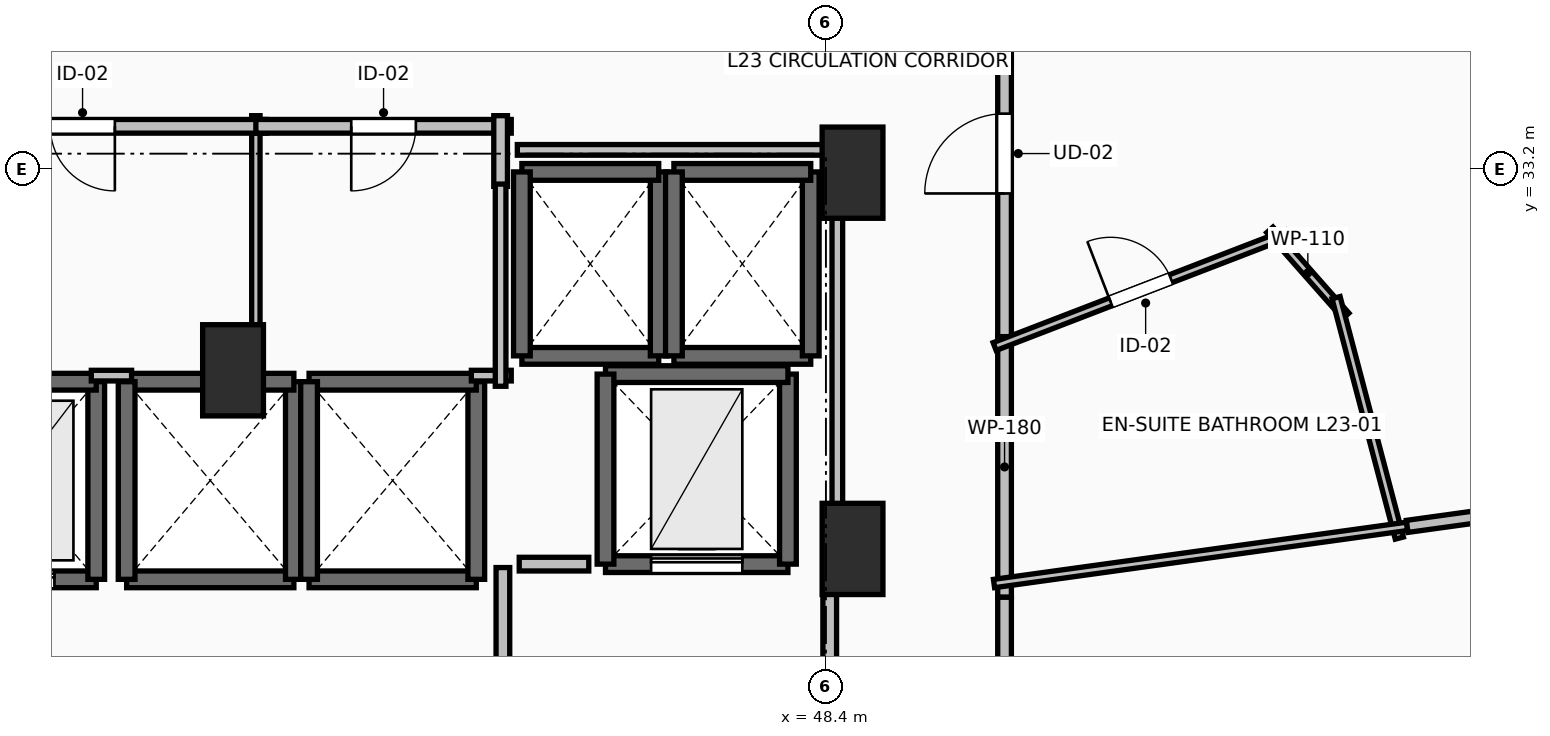
"""IFC4 building model, lengths in metres.
Left out: names, types, materials, properties, quantities, classifications, styles, units other than length and angle.
Written with IfcOpenShell. Run it as: python <this file> out.ifc"""

import sys

from ifc_helpers import new_model, si_unit, direction, frame, frame_2d, origin, origin_2d, place, context, subcontext, project, spatial, rectangle, extrude, element, fill, save


model = new_model("IFC4")
c1 = context("Model", 3, precision=1e-05, world=origin(), true_north=direction((0.0, 1.0)))
c2 = subcontext(c1, "Body", "Model", "MODEL_VIEW")
j1 = project(units=[si_unit("LENGTHUNIT", "METRE"), si_unit("PLANEANGLEUNIT", "RADIAN")], contexts=[c1])
p1 = place(None, origin())
s1 = spatial("IfcSite", under=j1, at=p1, CompositionType="ELEMENT")
p2 = place(p1, origin())
s2 = spatial("IfcBuilding", under=s1, at=p2, CompositionType="ELEMENT")
p3 = place(p2, frame((0.0, 0.0, 89.3)))
s3 = spatial("IfcBuildingStorey", under=s2, at=p3, CompositionType="ELEMENT", Elevation=89.3)
for number, where, z_axis, x_axis in (
    (1, (48.75, 33.15, 0.0), (0.0, 0.0, 1.0), (1.0, 0.0, 0.0)),
    (2, (48.75, 28.2, 0.0), (0.0, 0.0, 1.0), (1.0, 0.0, 0.0)),
    (3, (40.6, 30.55, 0.0), (0.0, 0.0, 1.0), (1.0, 0.0, 0.0)),
):
    element("IfcColumn", number, at=place(p3, frame(where, z_axis=z_axis, x_axis=x_axis)), inside=s3, PredefinedType="PILASTER", context=c2, shape_type="SweptSolid", body=[
        extrude(rectangle(XDim=0.8, YDim=1.2, at=origin_2d()), origin(), (0.0, 0.0, 1.0), 3.5),
    ])
p4 = place(p3, frame((36.6, 27.8, 0.0), z_axis=(0.0, 0.0, 1.0), x_axis=(1.0, 0.0, 0.0)))
e4 = element("IfcWall", 4, at=p4, inside=s3, PredefinedType="SOLIDWALL", context=c2, shape_type="SweptSolid", body=[
    extrude(rectangle(XDim=2.2, YDim=0.22, at=frame_2d((1.1, 0.0))), origin(), (0.0, 0.0, 1.0), 3.24),
])
p5 = place(p4, frame((0.55, 0.0, 0.0)))
e5 = element("IfcOpeningElement", 5, at=p5, cuts=e4, PredefinedType="OPENING", context=c2, shape_type="SweptSolid", body=[
    extrude(rectangle(XDim=1.1, YDim=2.2, at=frame_2d((0.55, 1.1))), frame((0.0, 0.125, 0.0), z_axis=(0.0, -1.0, 0.0), x_axis=(1.0, 0.0, 0.0)), (0.0, 0.0, 1.0), 0.25),
])
p6 = place(p3, frame((38.8, 27.8, 0.0), z_axis=(0.0, 0.0, 1.0), x_axis=(0.0, 1.0, 0.0)))
e6 = element("IfcWall", 6, at=p6, inside=s3, PredefinedType="SOLIDWALL", context=c2, shape_type="SweptSolid", body=[
    extrude(rectangle(XDim=2.6, YDim=0.22, at=frame_2d((1.3, 0.0))), origin(), (0.0, 0.0, 1.0), 3.24),
])
for number, where, z_axis, x_axis in (
    (7, (38.8, 30.4, 0.0), (0.0, 0.0, 1.0), (-1.0, 0.0, 0.0)),
    (8, (39.2, 27.8, 0.0), (0.0, 0.0, 1.0), (1.0, 0.0, 0.0)),
):
    element("IfcWall", number, at=place(p3, frame(where, z_axis=z_axis, x_axis=x_axis)), inside=s3, PredefinedType="SOLIDWALL", context=c2, shape_type="SweptSolid", body=[
        extrude(rectangle(XDim=2.2, YDim=0.22, at=frame_2d((1.1, 0.0))), origin(), (0.0, 0.0, 1.0), 3.24),
    ])
p7 = place(p3, frame((41.4, 27.8, 0.0), z_axis=(0.0, 0.0, 1.0), x_axis=(0.0, 1.0, 0.0)))
e9 = element("IfcWall", 9, at=p7, inside=s3, PredefinedType="SOLIDWALL", context=c2, shape_type="SweptSolid", body=[
    extrude(rectangle(XDim=2.6, YDim=0.22, at=frame_2d((1.3, 0.0))), origin(), (0.0, 0.0, 1.0), 3.24),
])
p8 = place(p3, frame((41.4, 30.4, 0.0), z_axis=(0.0, 0.0, 1.0), x_axis=(-1.0, 0.0, 0.0)))
e10 = element("IfcWall", 10, at=p8, inside=s3, PredefinedType="SOLIDWALL", context=c2, shape_type="SweptSolid", body=[
    extrude(rectangle(XDim=2.2, YDim=0.22, at=frame_2d((1.1, 0.0))), origin(), (0.0, 0.0, 1.0), 3.24),
])
p9 = place(p3, frame((39.2, 30.4, 0.0), z_axis=(0.0, 0.0, 1.0), x_axis=(0.0, -1.0, 0.0)))
e11 = element("IfcWall", 11, at=p9, inside=s3, PredefinedType="SOLIDWALL", context=c2, shape_type="SweptSolid", body=[
    extrude(rectangle(XDim=2.6, YDim=0.22, at=frame_2d((1.3, 0.0))), origin(), (0.0, 0.0, 1.0), 3.24),
])
p10 = place(p3, frame((41.6, 27.8, 0.0), z_axis=(0.0, 0.0, 1.0), x_axis=(1.0, 0.0, 0.0)))
e12 = element("IfcWall", 12, at=p10, inside=s3, PredefinedType="SOLIDWALL", context=c2, shape_type="SweptSolid", body=[
    extrude(rectangle(XDim=2.2, YDim=0.22, at=frame_2d((1.1, 0.0))), origin(), (0.0, 0.0, 1.0), 3.24),
])
p11 = place(p3, frame((43.8, 27.8, 0.0), z_axis=(0.0, 0.0, 1.0), x_axis=(0.0, 1.0, 0.0)))
e13 = element("IfcWall", 13, at=p11, inside=s3, PredefinedType="SOLIDWALL", context=c2, shape_type="SweptSolid", body=[
    extrude(rectangle(XDim=2.6, YDim=0.22, at=frame_2d((1.3, 0.0))), origin(), (0.0, 0.0, 1.0), 3.24),
])
p12 = place(p3, frame((43.8, 30.4, 0.0), z_axis=(0.0, 0.0, 1.0), x_axis=(-1.0, 0.0, 0.0)))
e14 = element("IfcWall", 14, at=p12, inside=s3, PredefinedType="SOLIDWALL", context=c2, shape_type="SweptSolid", body=[
    extrude(rectangle(XDim=2.2, YDim=0.22, at=frame_2d((1.1, 0.0))), origin(), (0.0, 0.0, 1.0), 3.24),
])
p13 = place(p3, frame((41.6, 30.4, 0.0), z_axis=(0.0, 0.0, 1.0), x_axis=(0.0, -1.0, 0.0)))
e15 = element("IfcWall", 15, at=p13, inside=s3, PredefinedType="SOLIDWALL", context=c2, shape_type="SweptSolid", body=[
    extrude(rectangle(XDim=2.6, YDim=0.22, at=frame_2d((1.3, 0.0))), origin(), (0.0, 0.0, 1.0), 3.24),
])
p14 = place(p3, frame((44.4, 30.74, 0.0), z_axis=(0.0, 0.0, 1.0), x_axis=(1.0, 0.0, 0.0)))
e16 = element("IfcWall", 16, at=p14, inside=s3, PredefinedType="SOLIDWALL", context=c2, shape_type="SweptSolid", body=[
    extrude(rectangle(XDim=1.8, YDim=0.22, at=frame_2d((0.9, 0.0))), origin(), (0.0, 0.0, 1.0), 3.24),
])
p15 = place(p3, frame((46.2, 30.74, 0.0), z_axis=(0.0, 0.0, 1.0), x_axis=(0.0, 1.0, 0.0)))
e17 = element("IfcWall", 17, at=p15, inside=s3, PredefinedType="SOLIDWALL", context=c2, shape_type="SweptSolid", body=[
    extrude(rectangle(XDim=2.42, YDim=0.22, at=frame_2d((1.21, 0.0))), origin(), (0.0, 0.0, 1.0), 3.24),
])
p16 = place(p3, frame((46.2, 33.16, 0.0), z_axis=(0.0, 0.0, 1.0), x_axis=(-1.0, 0.0, 0.0)))
e18 = element("IfcWall", 18, at=p16, inside=s3, PredefinedType="SOLIDWALL", context=c2, shape_type="SweptSolid", body=[
    extrude(rectangle(XDim=1.8, YDim=0.22, at=frame_2d((0.9, 0.0))), origin(), (0.0, 0.0, 1.0), 3.24),
])
p17 = place(p3, frame((44.4, 33.16, 0.0), z_axis=(0.0, 0.0, 1.0), x_axis=(0.0, -1.0, 0.0)))
e19 = element("IfcWall", 19, at=p17, inside=s3, PredefinedType="SOLIDWALL", context=c2, shape_type="SweptSolid", body=[
    extrude(rectangle(XDim=2.42, YDim=0.22, at=frame_2d((1.21, 0.0))), origin(), (0.0, 0.0, 1.0), 3.24),
])
p18 = place(p3, frame((46.4, 30.74, 0.0), z_axis=(0.0, 0.0, 1.0), x_axis=(1.0, 0.0, 0.0)))
e20 = element("IfcWall", 20, at=p18, inside=s3, PredefinedType="SOLIDWALL", context=c2, shape_type="SweptSolid", body=[
    extrude(rectangle(XDim=1.8, YDim=0.22, at=frame_2d((0.9, 0.0))), origin(), (0.0, 0.0, 1.0), 3.24),
])
p19 = place(p3, frame((48.2, 30.74, 0.0), z_axis=(0.0, 0.0, 1.0), x_axis=(0.0, 1.0, 0.0)))
e21 = element("IfcWall", 21, at=p19, inside=s3, PredefinedType="SOLIDWALL", context=c2, shape_type="SweptSolid", body=[
    extrude(rectangle(XDim=2.42, YDim=0.22, at=frame_2d((1.21, 0.0))), origin(), (0.0, 0.0, 1.0), 3.24),
])
p20 = place(p3, frame((48.2, 33.16, 0.0), z_axis=(0.0, 0.0, 1.0), x_axis=(-1.0, 0.0, 0.0)))
e22 = element("IfcWall", 22, at=p20, inside=s3, PredefinedType="SOLIDWALL", context=c2, shape_type="SweptSolid", body=[
    extrude(rectangle(XDim=1.8, YDim=0.22, at=frame_2d((0.9, 0.0))), origin(), (0.0, 0.0, 1.0), 3.24),
])
p21 = place(p3, frame((46.4, 33.16, 0.0), z_axis=(0.0, 0.0, 1.0), x_axis=(0.0, -1.0, 0.0)))
e23 = element("IfcWall", 23, at=p21, inside=s3, PredefinedType="SOLIDWALL", context=c2, shape_type="SweptSolid", body=[
    extrude(rectangle(XDim=2.42, YDim=0.22, at=frame_2d((1.21, 0.0))), origin(), (0.0, 0.0, 1.0), 3.24),
])
p22 = place(p3, frame((45.5, 28.0, 0.0), z_axis=(0.0, 0.0, 1.0), x_axis=(1.0, 0.0, 0.0)))
e24 = element("IfcWall", 24, at=p22, inside=s3, PredefinedType="SHEAR", context=c2, shape_type="SweptSolid", body=[
    extrude(rectangle(XDim=2.4, YDim=0.22, at=frame_2d((1.2, 0.0))), origin(), (0.0, 0.0, 1.0), 3.24),
])
p23 = place(p22, frame((0.6, 0.0, 0.0)))
e25 = element("IfcOpeningElement", 25, at=p23, cuts=e24, PredefinedType="OPENING", context=c2, shape_type="SweptSolid", body=[
    extrude(rectangle(XDim=1.2, YDim=2.2, at=frame_2d((0.6, 1.1))), frame((0.0, 0.125, 0.0), z_axis=(0.0, -1.0, 0.0), x_axis=(1.0, 0.0, 0.0)), (0.0, 0.0, 1.0), 0.25),
])
p24 = place(p3, frame((47.9, 28.0, 0.0), z_axis=(0.0, 0.0, 1.0), x_axis=(0.0, 1.0, 0.0)))
e26 = element("IfcWall", 26, at=p24, inside=s3, PredefinedType="SHEAR", context=c2, shape_type="SweptSolid", body=[
    extrude(rectangle(XDim=2.5, YDim=0.22, at=frame_2d((1.25, 0.0))), origin(), (0.0, 0.0, 1.0), 3.24),
])
p25 = place(p3, frame((47.9, 30.5, 0.0), z_axis=(0.0, 0.0, 1.0), x_axis=(-1.0, 0.0, 0.0)))
e27 = element("IfcWall", 27, at=p25, inside=s3, PredefinedType="SHEAR", context=c2, shape_type="SweptSolid", body=[
    extrude(rectangle(XDim=2.4, YDim=0.22, at=frame_2d((1.2, 0.0))), origin(), (0.0, 0.0, 1.0), 3.24),
])
p26 = place(p3, frame((45.5, 30.5, 0.0), z_axis=(0.0, 0.0, 1.0), x_axis=(0.0, -1.0, 0.0)))
e28 = element("IfcWall", 28, at=p26, inside=s3, PredefinedType="SHEAR", context=c2, shape_type="SweptSolid", body=[
    extrude(rectangle(XDim=2.5, YDim=0.22, at=frame_2d((1.25, 0.0))), origin(), (0.0, 0.0, 1.0), 3.24),
])
p27 = place(p3, frame((44.15, 27.955, 0.0), z_axis=(0.0, 0.0, 1.0), x_axis=(0.0, -1.0, 0.0)))
e29 = element("IfcWall", 29, at=p27, inside=s3, PredefinedType="PARTITIONING", context=c2, shape_type="SweptSolid", body=[
    extrude(rectangle(XDim=3.91, YDim=0.18, at=frame_2d((1.955, 0.0))), origin(), (0.0, 0.0, 1.0), 3.24),
])
p28 = place(p27, frame((1.355, 0.0, 0.0)))
e30 = element("IfcOpeningElement", 30, at=p28, cuts=e29, PredefinedType="OPENING", context=c2, shape_type="SweptSolid", body=[
    extrude(rectangle(XDim=1.2, YDim=2.15, at=frame_2d((0.6, 1.075))), frame((0.0, 0.105, 0.0), z_axis=(0.0, -1.0, 0.0), x_axis=(1.0, 0.0, 0.0)), (0.0, 0.0, 1.0), 0.21),
])
p29 = place(p3, frame((48.45, 23.95, 0.0), z_axis=(0.0, 0.0, 1.0), x_axis=(0.0, 1.0, 0.0)))
e31 = element("IfcWall", 31, at=p29, inside=s3, PredefinedType="PARTITIONING", context=c2, shape_type="SweptSolid", body=[
    extrude(rectangle(XDim=4.05, YDim=0.18, at=frame_2d((2.025, 0.0))), origin(), (0.0, 0.0, 1.0), 3.24),
])
p30 = place(p29, frame((1.425, 0.0, 0.0)))
e32 = element("IfcOpeningElement", 32, at=p30, cuts=e31, PredefinedType="OPENING", context=c2, shape_type="SweptSolid", body=[
    extrude(rectangle(XDim=1.2, YDim=2.15, at=frame_2d((0.6, 1.075))), frame((0.0, 0.105, 0.0), z_axis=(0.0, -1.0, 0.0), x_axis=(1.0, 0.0, 0.0)), (0.0, 0.0, 1.0), 0.21),
])
p31 = place(p3, frame((40.9, 30.34, 0.0), z_axis=(0.0, 0.0, 1.0), x_axis=(0.0, 1.0, 0.0)))
e33 = element("IfcWall", 33, at=p31, inside=s3, PredefinedType="PARTITIONING", context=c2, shape_type="SweptSolid", body=[
    extrude(rectangle(XDim=3.56, YDim=0.11, at=frame_2d((1.78, 0.0))), origin(), (0.0, 0.0, 1.0), 3.24),
])
p32 = place(p3, frame((41.04, 33.76, 0.0), z_axis=(0.0, 0.0, 1.0), x_axis=(-1.0, 0.0, 0.0)))
e34 = element("IfcWall", 34, at=p32, inside=s3, PredefinedType="PARTITIONING", context=c2, shape_type="SweptSolid", body=[
    extrude(rectangle(XDim=4.84, YDim=0.18, at=frame_2d((2.42, 0.0))), origin(), (0.0, 0.0, 1.0), 3.24),
])
p33 = place(p32, frame((1.995, 0.0, 0.0)))
e35 = element("IfcOpeningElement", 35, at=p33, cuts=e34, PredefinedType="OPENING", context=c2, shape_type="SweptSolid", body=[
    extrude(rectangle(XDim=0.85, YDim=2.1, at=frame_2d((0.425, 1.05))), frame((0.0, 0.105, 0.0), z_axis=(0.0, -1.0, 0.0), x_axis=(1.0, 0.0, 0.0)), (0.0, 0.0, 1.0), 0.21),
])
p34 = place(p3, frame((44.26, 33.76, 0.0), z_axis=(0.0, 0.0, 1.0), x_axis=(-1.0, 0.0, 0.0)))
e36 = element("IfcWall", 36, at=p34, inside=s3, PredefinedType="PARTITIONING", context=c2, shape_type="SweptSolid", body=[
    extrude(rectangle(XDim=3.36, YDim=0.18, at=frame_2d((1.68, 0.0))), origin(), (0.0, 0.0, 1.0), 3.24),
])
p35 = place(p34, frame((1.255, 0.0, 0.0)))
e37 = element("IfcOpeningElement", 37, at=p35, cuts=e36, PredefinedType="OPENING", context=c2, shape_type="SweptSolid", body=[
    extrude(rectangle(XDim=0.85, YDim=2.1, at=frame_2d((0.425, 1.05))), frame((0.0, 0.105, 0.0), z_axis=(0.0, -1.0, 0.0), x_axis=(1.0, 0.0, 0.0)), (0.0, 0.0, 1.0), 0.21),
])
p36 = place(p3, frame((44.12, 32.97, 0.0), z_axis=(0.0, 0.0, 1.0), x_axis=(0.0, 1.0, 0.0)))
e38 = element("IfcWall", 38, at=p36, inside=s3, PredefinedType="PARTITIONING", context=c2, shape_type="SweptSolid", body=[
    extrude(rectangle(XDim=0.93, YDim=0.18, at=frame_2d((0.465, 0.0))), origin(), (0.0, 0.0, 1.0), 3.24),
])
p37 = place(p3, frame((50.75, 30.853, 0.0), z_axis=(0.0, 0.0, 1.0), x_axis=(0.0, 1.0, 0.0)))
e39 = element("IfcWall", 39, at=p37, inside=s3, PredefinedType="PARTITIONING", context=c2, shape_type="SweptSolid", body=[
    extrude(rectangle(XDim=5.097, YDim=0.18, at=frame_2d((2.548, 0.0))), origin(), (0.0, 0.0, 1.0), 2.432),
])
p38 = place(p37, frame((2.023, 0.0, 0.0)))
e40 = element("IfcOpeningElement", 40, at=p38, cuts=e39, PredefinedType="OPENING", context=c2, shape_type="SweptSolid", body=[
    extrude(rectangle(XDim=1.05, YDim=2.2, at=frame_2d((0.525, 1.1))), frame((0.0, 0.105, 0.0), z_axis=(0.0, -1.0, 0.0), x_axis=(1.0, 0.0, 0.0)), (0.0, 0.0, 1.0), 0.21),
])
p39 = place(p3, frame((50.75, 27.564, 0.0), z_axis=(0.0, 0.0, 1.0), x_axis=(0.0, 1.0, 0.0)))
e41 = element("IfcWall", 41, at=p39, inside=s3, PredefinedType="PARTITIONING", context=c2, shape_type="SweptSolid", body=[
    extrude(rectangle(XDim=3.429, YDim=0.18, at=frame_2d((1.714, 0.0))), origin(), (0.0, 0.0, 1.0), 2.432),
])
p40 = place(p3, frame((50.75, 16.409, 0.0), z_axis=(0.0, 0.0, 1.0), x_axis=(0.0, 1.0, 0.0)))
e42 = element("IfcWall", 42, at=p40, inside=s3, PredefinedType="PARTITIONING", context=c2, shape_type="SweptSolid", body=[
    extrude(rectangle(XDim=11.155, YDim=0.18, at=frame_2d((5.578, 0.0))), origin(), (0.0, 0.0, 1.0), 2.432),
])
p41 = place(p40, frame((5.077, 0.0, 0.0)))
e43 = element("IfcOpeningElement", 43, at=p41, cuts=e42, PredefinedType="OPENING", context=c2, shape_type="SweptSolid", body=[
    extrude(rectangle(XDim=1.0, YDim=2.15, at=frame_2d((0.5, 1.075))), frame((0.0, 0.105, 0.0), z_axis=(0.0, -1.0, 0.0), x_axis=(1.0, 0.0, 0.0)), (0.0, 0.0, 1.0), 0.21),
])
p42 = place(p3, frame((54.24, 32.398, 0.0), z_axis=(0.0, 0.0, 1.0), x_axis=(0.661931735756, -0.749564124808, 0.0)))
e44 = element("IfcWall", 44, at=p42, inside=s3, PredefinedType="PARTITIONING", context=c2, shape_type="SweptSolid", body=[
    extrude(rectangle(XDim=1.51, YDim=0.11, at=frame_2d((0.755, 0.0))), origin(), (0.0, 0.0, 1.0), 3.24),
])
p43 = place(p3, frame((55.111, 31.506, 0.0), z_axis=(0.0, 0.0, 1.0), x_axis=(0.254405137241, -0.967097733502, 0.0)))
e45 = element("IfcWall", 45, at=p43, inside=s3, PredefinedType="PARTITIONING", context=c2, shape_type="SweptSolid", body=[
    extrude(rectangle(XDim=3.271, YDim=0.11, at=frame_2d((1.636, 0.0))), origin(), (0.0, 0.0, 1.0), 2.922),
])
p44 = place(p3, frame((56.047, 28.497, 0.0), z_axis=(0.0, 0.0, 1.0), x_axis=(-0.990553307294, -0.137128207927, 0.0)))
e46 = element("IfcWall", 46, at=p44, inside=s3, PredefinedType="PARTITIONING", context=c2, shape_type="SweptSolid", body=[
    extrude(rectangle(XDim=5.487, YDim=0.11, at=frame_2d((2.744, 0.0))), origin(), (0.0, 0.0, 1.0), 2.432),
])
p45 = place(p3, frame((50.619, 30.863, 0.0), z_axis=(0.0, 0.0, 1.0), x_axis=(0.933189718051, 0.359384126144, 0.0)))
e47 = element("IfcWall", 47, at=p45, inside=s3, PredefinedType="PARTITIONING", context=c2, shape_type="SweptSolid", body=[
    extrude(rectangle(XDim=4.119, YDim=0.11, at=frame_2d((2.06, 0.0))), origin(), (0.0, 0.0, 1.0), 2.972),
])
p46 = place(p45, frame((1.635, 0.0, 0.0)))
e48 = element("IfcOpeningElement", 48, at=p46, cuts=e47, PredefinedType="OPENING", context=c2, shape_type="SweptSolid", body=[
    extrude(rectangle(XDim=0.85, YDim=2.1, at=frame_2d((0.425, 1.05))), frame((0.0, 0.07, 0.0), z_axis=(0.0, -1.0, 0.0), x_axis=(1.0, 0.0, 0.0)), (0.0, 0.0, 1.0), 0.14),
])
p47 = place(p3, frame((56.047, 28.497, 0.0), z_axis=(0.0, 0.0, 1.0), x_axis=(0.990569127114, 0.137013883997, 0.0)))
e49 = element("IfcWall", 49, at=p47, inside=s3, PredefinedType="PARTITIONING", context=c2, shape_type="SweptSolid", body=[
    extrude(rectangle(XDim=7.812, YDim=0.16, at=frame_2d((3.906, 0.0))), origin(), (0.0, 0.0, 1.0), 2.677),
])
p48 = place(p3, frame((45.28, 28.0, 0.0), z_axis=(0.0, 0.0, 1.0), x_axis=(-1.0, 0.0, 0.0)))
e50 = element("IfcWall", 50, at=p48, inside=s3, PredefinedType="PARTITIONING", context=c2, shape_type="SweptSolid", body=[
    extrude(rectangle(XDim=0.915, YDim=0.18, at=frame_2d((0.458, 0.0))), origin(), (0.0, 0.0, 1.0), 3.24),
])
p49 = place(p3, frame((38.735, 30.48, 0.0), z_axis=(0.0, 0.0, 1.0), x_axis=(1.0, 0.0, 0.0)))
e51 = element("IfcWall", 51, at=p49, inside=s3, PredefinedType="PARTITIONING", context=c2, shape_type="SweptSolid", body=[
    extrude(rectangle(XDim=0.53, YDim=0.14, at=frame_2d((0.265, 0.0))), origin(), (0.0, 0.0, 1.0), 2.432),
])
p50 = place(p3, frame((43.735, 30.48, 0.0), z_axis=(0.0, 0.0, 1.0), x_axis=(1.0, 0.0, 0.0)))
e52 = element("IfcWall", 52, at=p50, inside=s3, PredefinedType="PARTITIONING", context=c2, shape_type="SweptSolid", body=[
    extrude(rectangle(XDim=0.525, YDim=0.14, at=frame_2d((0.262, 0.0))), origin(), (0.0, 0.0, 1.0), 3.24),
])
p51 = place(p3, frame((44.12, 30.34, 0.0), z_axis=(0.0, 0.0, 1.0), x_axis=(0.0, 1.0, 0.0)))
e53 = element("IfcWall", 53, at=p51, inside=s3, PredefinedType="PARTITIONING", context=c2, shape_type="SweptSolid", body=[
    extrude(rectangle(XDim=2.66, YDim=0.14, at=frame_2d((1.33, 0.0))), origin(), (0.0, 0.0, 1.0), 3.24),
])
p52 = place(p3, frame((44.34, 33.45, 0.0), z_axis=(0.0, 0.0, 1.0), x_axis=(1.0, 0.0, 0.0)))
e54 = element("IfcWall", 54, at=p52, inside=s3, PredefinedType="PARTITIONING", context=c2, shape_type="SweptSolid", body=[
    extrude(rectangle(XDim=4.21, YDim=0.14, at=frame_2d((2.105, 0.0))), origin(), (0.0, 0.0, 1.0), 2.432),
])
p53 = place(p3, frame((48.55, 33.45, 0.0), z_axis=(0.0, 0.0, 1.0), x_axis=(0.0, -1.0, 0.0)))
e55 = element("IfcWall", 55, at=p53, inside=s3, PredefinedType="PARTITIONING", context=c2, shape_type="SweptSolid", body=[
    extrude(rectangle(XDim=5.254, YDim=0.14, at=frame_2d((2.627, 0.0))), origin(), (0.0, 0.0, 1.0), 2.432),
])
p54 = place(p5, origin())
e56 = element("IfcDoor", 56, at=p54, inside=s3, OperationType="SLIDING_TO_LEFT", PredefinedType="DOOR", context=c2, shape_type="SweptSolid", body=[
    extrude(rectangle(XDim=1.1, YDim=2.2, at=frame_2d((0.55, 1.1))), frame((0.0, 0.025, 0.0), z_axis=(0.0, -1.0, 0.0), x_axis=(1.0, 0.0, 0.0)), (0.0, 0.0, 1.0), 0.05),
])
fill(e5, e56)
p55 = place(p23, origin())
e57 = element("IfcDoor", 57, at=p55, inside=s3, OperationType="SLIDING_TO_LEFT", PredefinedType="DOOR", context=c2, shape_type="SweptSolid", body=[
    extrude(rectangle(XDim=1.2, YDim=2.2, at=frame_2d((0.6, 1.1))), frame((0.0, 0.025, 0.0), z_axis=(0.0, -1.0, 0.0), x_axis=(1.0, 0.0, 0.0)), (0.0, 0.0, 1.0), 0.05),
])
fill(e25, e57)
p56 = place(p33, origin())
e58 = element("IfcDoor", 58, at=p56, inside=s3, OperationType="SINGLE_SWING_LEFT", PredefinedType="DOOR", context=c2, shape_type="SweptSolid", body=[
    extrude(rectangle(XDim=0.85, YDim=2.1, at=frame_2d((0.425, 1.05))), frame((0.0, 0.025, 0.0), z_axis=(0.0, -1.0, 0.0), x_axis=(1.0, 0.0, 0.0)), (0.0, 0.0, 1.0), 0.05),
])
fill(e35, e58)
p57 = place(p35, origin())
e59 = element("IfcDoor", 59, at=p57, inside=s3, OperationType="SINGLE_SWING_RIGHT", PredefinedType="DOOR", context=c2, shape_type="SweptSolid", body=[
    extrude(rectangle(XDim=0.85, YDim=2.1, at=frame_2d((0.425, 1.05))), frame((0.0, 0.025, 0.0), z_axis=(0.0, -1.0, 0.0), x_axis=(1.0, 0.0, 0.0)), (0.0, 0.0, 1.0), 0.05),
])
fill(e37, e59)
p58 = place(p38, origin())
e60 = element("IfcDoor", 60, at=p58, inside=s3, OperationType="SINGLE_SWING_LEFT", PredefinedType="DOOR", context=c2, shape_type="SweptSolid", body=[
    extrude(rectangle(XDim=1.05, YDim=2.2, at=frame_2d((0.525, 1.1))), frame((0.0, 0.025, 0.0), z_axis=(0.0, -1.0, 0.0), x_axis=(1.0, 0.0, 0.0)), (0.0, 0.0, 1.0), 0.05),
])
fill(e40, e60)
p59 = place(p46, origin())
e61 = element("IfcDoor", 61, at=p59, inside=s3, OperationType="SINGLE_SWING_LEFT", PredefinedType="DOOR", context=c2, shape_type="SweptSolid", body=[
    extrude(rectangle(XDim=0.85, YDim=2.1, at=frame_2d((0.425, 1.05))), frame((0.0, 0.025, 0.0), z_axis=(0.0, -1.0, 0.0), x_axis=(1.0, 0.0, 0.0)), (0.0, 0.0, 1.0), 0.05),
])
fill(e48, e61)
save(model, sys.argv[1])
